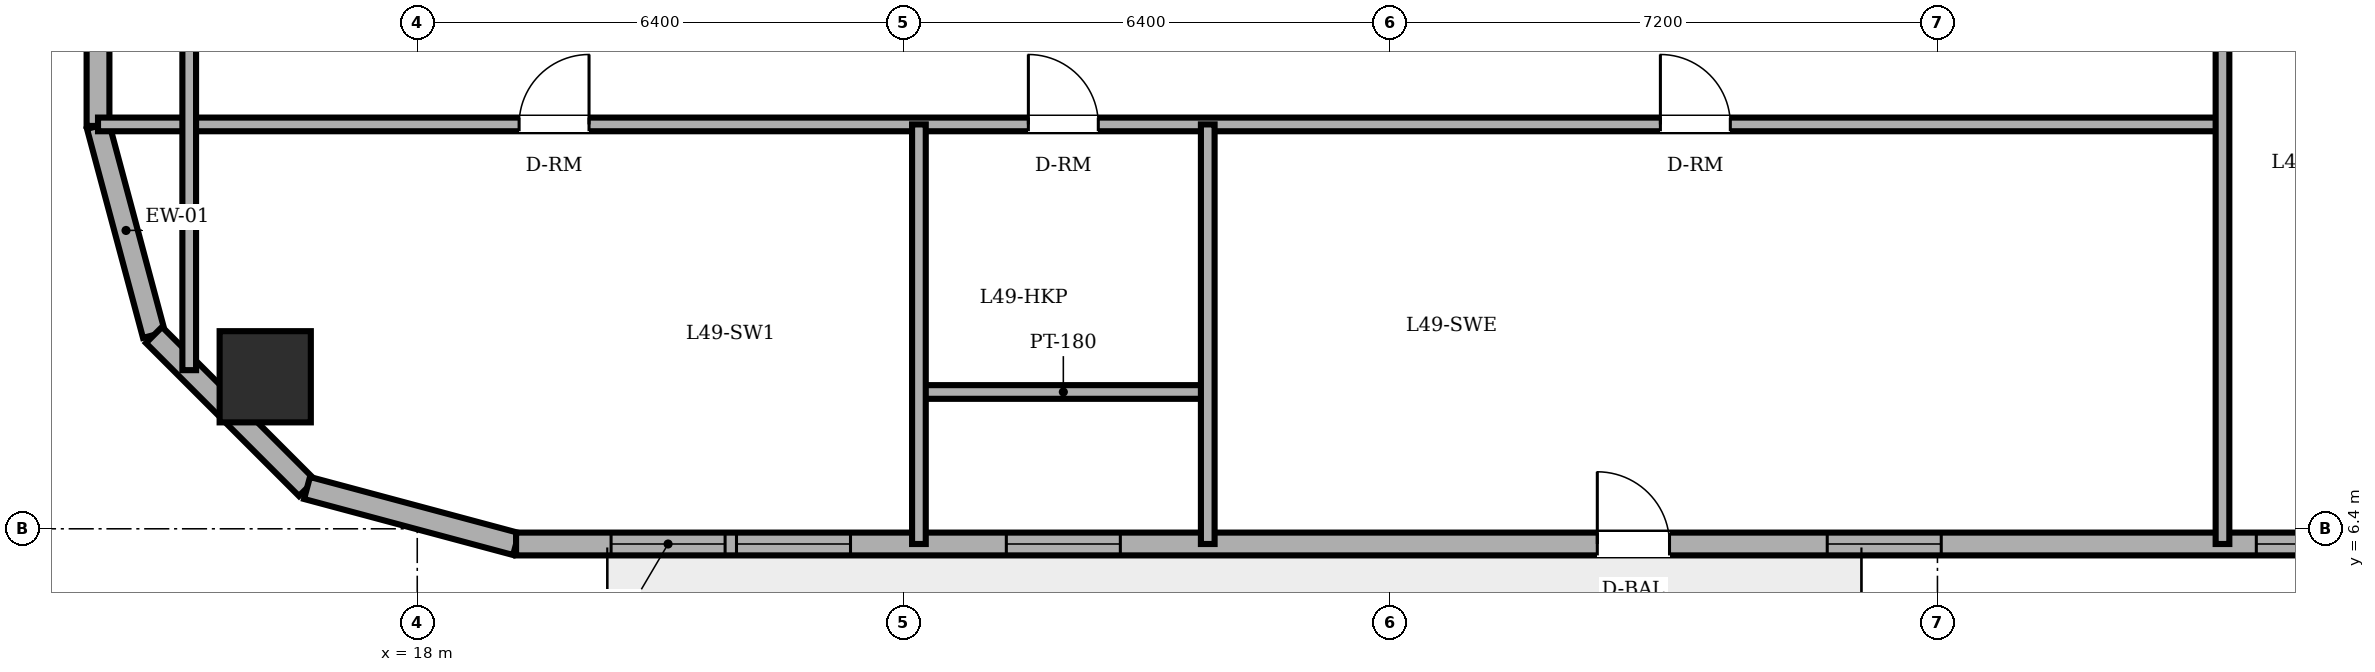
"""IFC4 building model, lengths in metres.
Left out: names, types, materials, properties, quantities, classifications, styles, units other than length and angle.
Written with IfcOpenShell. Run it as: python <this file> out.ifc"""

import sys

from ifc_helpers import new_model, si_unit, direction, frame, frame_2d, origin, origin_2d, place, context, subcontext, project, spatial, rectangle, circle, extrude, element, fill, save


model = new_model("IFC4")
c1 = context("Model", 3, precision=1e-05, world=origin(), true_north=direction((0.0, 1.0)))
c2 = subcontext(c1, "Body", "Model", "MODEL_VIEW")
j1 = project(units=[si_unit("LENGTHUNIT", "METRE"), si_unit("PLANEANGLEUNIT", "RADIAN")], contexts=[c1])
p1 = place(None, origin())
s1 = spatial("IfcSite", under=j1, at=p1, CompositionType="ELEMENT")
p2 = place(p1, origin())
s2 = spatial("IfcBuilding", under=s1, at=p2, CompositionType="ELEMENT")
p3 = place(p2, frame((0.0, 0.0, 187.0)))
s3 = spatial("IfcBuildingStorey", under=s2, at=p3, CompositionType="ELEMENT", Elevation=187.0)
p4 = place(p3, frame((16.0, 8.4, 0.0), z_axis=(0.0, 0.0, 1.0), x_axis=(1.0, 0.0, 0.0)))
e1 = element("IfcColumn", 1, at=p4, inside=s3, PredefinedType="COLUMN", context=c2, shape_type="SweptSolid", body=[
    extrude(circle(Radius=0.6, at=origin_2d()), origin(), (0.0, 0.0, 1.0), 3.6),
])
p5 = place(p3, frame((13.8, 11.7, 0.0), z_axis=(0.0, 0.0, 1.0), x_axis=(0.258884674387, -0.965908238586, 0.0)))
e2 = element("IfcWall", 2, at=p5, inside=s3, PredefinedType="SOLIDWALL", context=c2, shape_type="SweptSolid", body=[
    extrude(rectangle(XDim=2.847, YDim=0.3, at=frame_2d((1.424, 0.0))), origin(), (0.0, 0.0, 1.0), 3.36),
])
p6 = place(p3, frame((14.537, 8.95, 0.0), z_axis=(0.0, 0.0, 1.0), x_axis=(0.707106781187, -0.707106781187, 0.0)))
e3 = element("IfcWall", 3, at=p6, inside=s3, PredefinedType="SOLIDWALL", context=c2, shape_type="SweptSolid", body=[
    extrude(rectangle(XDim=2.847, YDim=0.3, at=frame_2d((1.423, 0.0))), origin(), (0.0, 0.0, 1.0), 3.36),
])
p7 = place(p3, frame((16.55, 6.937, 0.0), z_axis=(0.0, 0.0, 1.0), x_axis=(0.965908238586, -0.258884674387, 0.0)))
e4 = element("IfcWall", 4, at=p7, inside=s3, PredefinedType="SOLIDWALL", context=c2, shape_type="SweptSolid", body=[
    extrude(rectangle(XDim=2.847, YDim=0.3, at=frame_2d((1.424, 0.0))), origin(), (0.0, 0.0, 1.0), 3.36),
])
p8 = place(p3, frame((19.3, 6.2, 0.0), z_axis=(0.0, 0.0, 1.0), x_axis=(1.0, 0.0, 0.0)))
e5 = element("IfcWall", 5, at=p8, inside=s3, PredefinedType="SOLIDWALL", context=c2, shape_type="SweptSolid", body=[
    extrude(rectangle(XDim=30.282, YDim=0.3, at=frame_2d((15.141, 0.0))), origin(), (0.0, 0.0, 1.0), 3.36),
])
p9 = place(p8, frame((14.225, 0.0, 0.0)))
e6 = element("IfcOpeningElement", 6, at=p9, cuts=e5, PredefinedType="OPENING", context=c2, shape_type="SweptSolid", body=[
    extrude(rectangle(XDim=0.95, YDim=2.2, at=frame_2d((0.475, 1.1))), frame((0.0, 0.16, 0.0), z_axis=(0.0, -1.0, 0.0), x_axis=(1.0, 0.0, 0.0)), (0.0, 0.0, 1.0), 0.32),
])
p10 = place(p8, frame((1.25, 0.0, 0.85)))
e7 = element("IfcOpeningElement", 7, at=p10, cuts=e5, PredefinedType="OPENING", context=c2, shape_type="SweptSolid", body=[
    extrude(rectangle(XDim=1.5, YDim=1.55, at=frame_2d((0.75, 0.775))), frame((0.0, 0.16, 0.0), z_axis=(0.0, -1.0, 0.0), x_axis=(1.0, 0.0, 0.0)), (0.0, 0.0, 1.0), 0.32),
])
p11 = place(p8, frame((2.9, 0.0, 0.85)))
e8 = element("IfcOpeningElement", 8, at=p11, cuts=e5, PredefinedType="OPENING", context=c2, shape_type="SweptSolid", body=[
    extrude(rectangle(XDim=1.5, YDim=1.55, at=frame_2d((0.75, 0.775))), frame((0.0, 0.16, 0.0), z_axis=(0.0, -1.0, 0.0), x_axis=(1.0, 0.0, 0.0)), (0.0, 0.0, 1.0), 0.32),
])
p12 = place(p8, frame((6.45, 0.0, 0.85)))
e9 = element("IfcOpeningElement", 9, at=p12, cuts=e5, PredefinedType="OPENING", context=c2, shape_type="SweptSolid", body=[
    extrude(rectangle(XDim=1.5, YDim=1.55, at=frame_2d((0.75, 0.775))), frame((0.0, 0.16, 0.0), z_axis=(0.0, -1.0, 0.0), x_axis=(1.0, 0.0, 0.0)), (0.0, 0.0, 1.0), 0.32),
])
p13 = place(p8, frame((17.25, 0.0, 0.85)))
e10 = element("IfcOpeningElement", 10, at=p13, cuts=e5, PredefinedType="OPENING", context=c2, shape_type="SweptSolid", body=[
    extrude(rectangle(XDim=1.5, YDim=1.55, at=frame_2d((0.75, 0.775))), frame((0.0, 0.16, 0.0), z_axis=(0.0, -1.0, 0.0), x_axis=(1.0, 0.0, 0.0)), (0.0, 0.0, 1.0), 0.32),
])
p14 = place(p8, frame((22.895, 0.0, 0.85)))
e11 = element("IfcOpeningElement", 11, at=p14, cuts=e5, PredefinedType="OPENING", context=c2, shape_type="SweptSolid", body=[
    extrude(rectangle(XDim=1.5, YDim=1.55, at=frame_2d((0.75, 0.775))), frame((0.0, 0.16, 0.0), z_axis=(0.0, -1.0, 0.0), x_axis=(1.0, 0.0, 0.0)), (0.0, 0.0, 1.0), 0.32),
])
p15 = place(p8, frame((25.848, 0.0, 0.85)))
e12 = element("IfcOpeningElement", 12, at=p15, cuts=e5, PredefinedType="OPENING", context=c2, shape_type="SweptSolid", body=[
    extrude(rectangle(XDim=1.5, YDim=1.55, at=frame_2d((0.75, 0.775))), frame((0.0, 0.16, 0.0), z_axis=(0.0, -1.0, 0.0), x_axis=(1.0, 0.0, 0.0)), (0.0, 0.0, 1.0), 0.32),
])
p16 = place(p3, frame((13.8, 36.3, 0.0), z_axis=(0.0, 0.0, 1.0), x_axis=(0.0, -1.0, 0.0)))
e13 = element("IfcWall", 13, at=p16, inside=s3, PredefinedType="SOLIDWALL", context=c2, shape_type="SweptSolid", body=[
    extrude(rectangle(XDim=24.6, YDim=0.3, at=frame_2d((12.3, 0.0))), origin(), (0.0, 0.0, 1.0), 3.36),
])
p17 = place(p16, frame((5.003, 0.0, 0.85)))
e14 = element("IfcOpeningElement", 14, at=p17, cuts=e13, PredefinedType="OPENING", context=c2, shape_type="SweptSolid", body=[
    extrude(rectangle(XDim=1.5, YDim=1.55, at=frame_2d((0.75, 0.775))), frame((0.0, 0.16, 0.0), z_axis=(0.0, -1.0, 0.0), x_axis=(1.0, 0.0, 0.0)), (0.0, 0.0, 1.0), 0.32),
])
p18 = place(p16, frame((8.277, 0.0, 0.85)))
e15 = element("IfcOpeningElement", 15, at=p18, cuts=e13, PredefinedType="OPENING", context=c2, shape_type="SweptSolid", body=[
    extrude(rectangle(XDim=1.5, YDim=1.55, at=frame_2d((0.75, 0.775))), frame((0.0, 0.16, 0.0), z_axis=(0.0, -1.0, 0.0), x_axis=(1.0, 0.0, 0.0)), (0.0, 0.0, 1.0), 0.32),
])
p19 = place(p16, frame((14.823, 0.0, 0.85)))
e16 = element("IfcOpeningElement", 16, at=p19, cuts=e13, PredefinedType="OPENING", context=c2, shape_type="SweptSolid", body=[
    extrude(rectangle(XDim=1.5, YDim=1.55, at=frame_2d((0.75, 0.775))), frame((0.0, 0.16, 0.0), z_axis=(0.0, -1.0, 0.0), x_axis=(1.0, 0.0, 0.0)), (0.0, 0.0, 1.0), 0.32),
])
p20 = place(p16, frame((18.097, 0.0, 0.85)))
e17 = element("IfcOpeningElement", 17, at=p20, cuts=e13, PredefinedType="OPENING", context=c2, shape_type="SweptSolid", body=[
    extrude(rectangle(XDim=1.5, YDim=1.55, at=frame_2d((0.75, 0.775))), frame((0.0, 0.16, 0.0), z_axis=(0.0, -1.0, 0.0), x_axis=(1.0, 0.0, 0.0)), (0.0, 0.0, 1.0), 0.32),
])
p21 = place(p3, frame((24.6, 8.2, 0.0), z_axis=(0.0, 0.0, 1.0), x_axis=(1.0, 0.0, 0.0)))
e18 = element("IfcWall", 18, at=p21, inside=s3, PredefinedType="PARTITIONING", context=c2, shape_type="SweptSolid", body=[
    extrude(rectangle(XDim=3.8, YDim=0.18, at=frame_2d((1.9, 0.0))), origin(), (0.0, 0.0, 1.0), 2.842),
])
p22 = place(p3, frame((13.8, 11.72, 0.0), z_axis=(0.0, 0.0, 1.0), x_axis=(1.0, 0.0, 0.0)))
e19 = element("IfcWall", 19, at=p22, inside=s3, PredefinedType="PARTITIONING", context=c2, shape_type="SweptSolid", body=[
    extrude(rectangle(XDim=27.95, YDim=0.18, at=frame_2d((13.975, 0.0))), origin(), (0.0, 0.0, 1.0), 3.36),
])
p23 = place(p22, frame((12.24, 0.0, 0.0)))
e20 = element("IfcOpeningElement", 20, at=p23, cuts=e19, PredefinedType="OPENING", context=c2, shape_type="SweptSolid", body=[
    extrude(rectangle(XDim=0.92, YDim=2.1, at=frame_2d((0.46, 1.05))), frame((0.0, 0.1, 0.0), z_axis=(0.0, -1.0, 0.0), x_axis=(1.0, 0.0, 0.0)), (0.0, 0.0, 1.0), 0.2),
])
p24 = place(p22, frame((5.54, 0.0, 0.0)))
e21 = element("IfcOpeningElement", 21, at=p24, cuts=e19, PredefinedType="OPENING", context=c2, shape_type="SweptSolid", body=[
    extrude(rectangle(XDim=0.92, YDim=2.1, at=frame_2d((0.46, 1.05))), frame((0.0, 0.1, 0.0), z_axis=(0.0, -1.0, 0.0), x_axis=(1.0, 0.0, 0.0)), (0.0, 0.0, 1.0), 0.2),
])
p25 = place(p22, frame((20.555, 0.0, 0.0)))
e22 = element("IfcOpeningElement", 22, at=p25, cuts=e19, PredefinedType="OPENING", context=c2, shape_type="SweptSolid", body=[
    extrude(rectangle(XDim=0.92, YDim=2.1, at=frame_2d((0.46, 1.05))), frame((0.0, 0.1, 0.0), z_axis=(0.0, -1.0, 0.0), x_axis=(1.0, 0.0, 0.0)), (0.0, 0.0, 1.0), 0.2),
])
p26 = place(p3, frame((15.0, 8.487, 0.0), z_axis=(0.0, 0.0, 1.0), x_axis=(0.0, 1.0, 0.0)))
e23 = element("IfcWall", 23, at=p26, inside=s3, PredefinedType="PARTITIONING", context=c2, shape_type="SweptSolid", body=[
    extrude(rectangle(XDim=5.693, YDim=0.18, at=frame_2d((2.846, 0.0))), origin(), (0.0, 0.0, 1.0), 3.36),
])
for number, where, z_axis, x_axis in (
    (24, (24.6, 6.2, 0.0), (0.0, 0.0, 1.0), (0.0, 1.0, 0.0)),
    (25, (28.4, 6.2, 0.0), (0.0, 0.0, 1.0), (0.0, 1.0, 0.0)),
):
    element("IfcWall", number, at=place(p3, frame(where, z_axis=z_axis, x_axis=x_axis)), inside=s3, PredefinedType="PARTITIONING", context=c2, shape_type="SweptSolid", body=[
        extrude(rectangle(XDim=5.52, YDim=0.18, at=frame_2d((2.76, 0.0))), origin(), (0.0, 0.0, 1.0), 3.36),
    ])
p27 = place(p3, frame((41.75, 6.2, 0.0), z_axis=(0.0, 0.0, 1.0), x_axis=(0.0, 1.0, 0.0)))
e26 = element("IfcWall", 26, at=p27, inside=s3, PredefinedType="PARTITIONING", context=c2, shape_type="SweptSolid", body=[
    extrude(rectangle(XDim=16.62, YDim=0.18, at=frame_2d((8.31, 0.0))), origin(), (0.0, 0.0, 1.0), 3.36),
])
p28 = place(p27, frame((10.35, 0.0, 0.0)))
e27 = element("IfcOpeningElement", 27, at=p28, cuts=e26, PredefinedType="OPENING", context=c2, shape_type="SweptSolid", body=[
    extrude(rectangle(XDim=0.92, YDim=2.1, at=frame_2d((0.46, 1.05))), frame((0.0, 0.1, 0.0), z_axis=(0.0, -1.0, 0.0), x_axis=(1.0, 0.0, 0.0)), (0.0, 0.0, 1.0), 0.2),
])
p29 = place(p9, origin())
e28 = element("IfcDoor", 28, at=p29, inside=s3, OperationType="SINGLE_SWING_LEFT", PredefinedType="DOOR", context=c2, shape_type="SweptSolid", body=[
    extrude(rectangle(XDim=0.95, YDim=2.2, at=frame_2d((0.475, 1.1))), frame((0.0, 0.025, 0.0), z_axis=(0.0, -1.0, 0.0), x_axis=(1.0, 0.0, 0.0)), (0.0, 0.0, 1.0), 0.05),
])
fill(e6, e28)
p30 = place(p10, origin())
e29 = element("IfcWindow", 29, at=p30, inside=s3, PartitioningType="DOUBLE_PANEL_VERTICAL", PredefinedType="WINDOW", context=c2, shape_type="SweptSolid", body=[
    extrude(rectangle(XDim=1.5, YDim=1.55, at=frame_2d((0.75, 0.775))), frame((0.0, 0.03, 0.0), z_axis=(0.0, -1.0, 0.0), x_axis=(1.0, 0.0, 0.0)), (0.0, 0.0, 1.0), 0.06),
])
fill(e7, e29)
p31 = place(p11, origin())
e30 = element("IfcWindow", 30, at=p31, inside=s3, PartitioningType="DOUBLE_PANEL_VERTICAL", PredefinedType="WINDOW", context=c2, shape_type="SweptSolid", body=[
    extrude(rectangle(XDim=1.5, YDim=1.55, at=frame_2d((0.75, 0.775))), frame((0.0, 0.03, 0.0), z_axis=(0.0, -1.0, 0.0), x_axis=(1.0, 0.0, 0.0)), (0.0, 0.0, 1.0), 0.06),
])
fill(e8, e30)
p32 = place(p12, origin())
e31 = element("IfcWindow", 31, at=p32, inside=s3, PartitioningType="DOUBLE_PANEL_VERTICAL", PredefinedType="WINDOW", context=c2, shape_type="SweptSolid", body=[
    extrude(rectangle(XDim=1.5, YDim=1.55, at=frame_2d((0.75, 0.775))), frame((0.0, 0.03, 0.0), z_axis=(0.0, -1.0, 0.0), x_axis=(1.0, 0.0, 0.0)), (0.0, 0.0, 1.0), 0.06),
])
fill(e9, e31)
p33 = place(p13, origin())
e32 = element("IfcWindow", 32, at=p33, inside=s3, PartitioningType="DOUBLE_PANEL_VERTICAL", PredefinedType="WINDOW", context=c2, shape_type="SweptSolid", body=[
    extrude(rectangle(XDim=1.5, YDim=1.55, at=frame_2d((0.75, 0.775))), frame((0.0, 0.03, 0.0), z_axis=(0.0, -1.0, 0.0), x_axis=(1.0, 0.0, 0.0)), (0.0, 0.0, 1.0), 0.06),
])
fill(e10, e32)
p34 = place(p14, origin())
e33 = element("IfcWindow", 33, at=p34, inside=s3, PartitioningType="DOUBLE_PANEL_VERTICAL", PredefinedType="WINDOW", context=c2, shape_type="SweptSolid", body=[
    extrude(rectangle(XDim=1.5, YDim=1.55, at=frame_2d((0.75, 0.775))), frame((0.0, 0.03, 0.0), z_axis=(0.0, -1.0, 0.0), x_axis=(1.0, 0.0, 0.0)), (0.0, 0.0, 1.0), 0.06),
])
fill(e11, e33)
p35 = place(p23, origin())
e34 = element("IfcDoor", 34, at=p35, inside=s3, OperationType="SINGLE_SWING_LEFT", PredefinedType="DOOR", context=c2, shape_type="SweptSolid", body=[
    extrude(rectangle(XDim=0.92, YDim=2.1, at=frame_2d((0.46, 1.05))), frame((0.0, 0.025, 0.0), z_axis=(0.0, -1.0, 0.0), x_axis=(1.0, 0.0, 0.0)), (0.0, 0.0, 1.0), 0.05),
])
fill(e20, e34)
p36 = place(p24, origin())
e35 = element("IfcDoor", 35, at=p36, inside=s3, OperationType="SINGLE_SWING_RIGHT", PredefinedType="DOOR", context=c2, shape_type="SweptSolid", body=[
    extrude(rectangle(XDim=0.92, YDim=2.1, at=frame_2d((0.46, 1.05))), frame((0.0, 0.025, 0.0), z_axis=(0.0, -1.0, 0.0), x_axis=(1.0, 0.0, 0.0)), (0.0, 0.0, 1.0), 0.05),
])
fill(e21, e35)
p37 = place(p25, origin())
e36 = element("IfcDoor", 36, at=p37, inside=s3, OperationType="SINGLE_SWING_LEFT", PredefinedType="DOOR", context=c2, shape_type="SweptSolid", body=[
    extrude(rectangle(XDim=0.92, YDim=2.1, at=frame_2d((0.46, 1.05))), frame((0.0, 0.025, 0.0), z_axis=(0.0, -1.0, 0.0), x_axis=(1.0, 0.0, 0.0)), (0.0, 0.0, 1.0), 0.05),
])
fill(e22, e36)
save(model, sys.argv[1])
